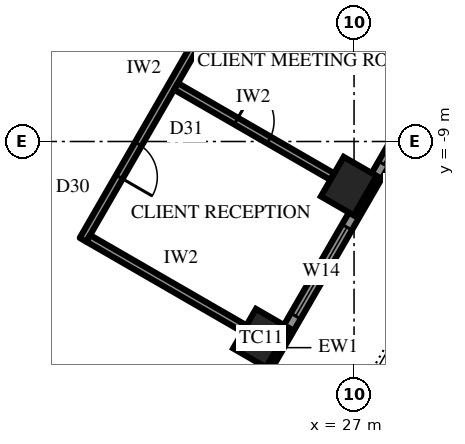
"""IFC4 building model, lengths in metres.
Left out: names, types, materials, properties, quantities, classifications, styles, units other than length and angle.
Written with IfcOpenShell. Run it as: python <this file> out.ifc"""

import sys

from ifc_helpers import new_model, si_unit, direction, frame, frame_2d, origin, origin_2d, place, context, subcontext, project, spatial, rectangle, extrude, element, fill, save


model = new_model("IFC4")
c1 = context("Model", 3, precision=1e-05, world=origin(), true_north=direction((0.0, 1.0)))
c2 = subcontext(c1, "Body", "Model", "MODEL_VIEW")
j1 = project(units=[si_unit("LENGTHUNIT", "METRE"), si_unit("PLANEANGLEUNIT", "RADIAN")], contexts=[c1])
p1 = place(None, origin())
s1 = spatial("IfcSite", under=j1, at=p1, CompositionType="ELEMENT")
p2 = place(p1, origin())
s2 = spatial("IfcBuilding", under=s1, at=p2, CompositionType="ELEMENT")
p3 = place(p2, frame((0.0, 0.0, 257.5)))
s3 = spatial("IfcBuildingStorey", under=s2, at=p3, CompositionType="ELEMENT", Elevation=257.5)
for number, where, z_axis, x_axis in (
    (1, (24.552, -14.175, 0.0), (0.0, 0.0, 1.0), (0.5, 0.866, 0.0)),
    (2, (26.861, -10.175, 0.0), (0.0, 0.0, 1.0), (0.5, 0.866, 0.0)),
):
    element("IfcColumn", number, at=place(p3, frame(where, z_axis=z_axis, x_axis=x_axis)), inside=s3, PredefinedType="COLUMN", context=c2, shape_type="SweptSolid", body=[
        extrude(rectangle(XDim=1.2, YDim=1.0, at=origin_2d()), origin(), (0.0, 0.0, 1.0), 4.2),
    ])
p4 = place(p3, frame((18.707, -25.299, 0.0), z_axis=(0.0, 0.0, 1.0), x_axis=(0.500000442367, 0.866025148383, 0.0)))
e3 = element("IfcWall", 3, at=p4, inside=s3, PredefinedType="SOLIDWALL", context=c2, shape_type="SweptSolid", body=[
    extrude(rectangle(XDim=25.113, YDim=0.3, at=frame_2d((12.556, 0.0))), origin(), (0.0, 0.0, 1.0), 2.8),
])
p5 = place(p4, frame((4.278, 0.0, 0.6)))
e4 = element("IfcOpeningElement", 4, at=p5, cuts=e3, PredefinedType="OPENING", context=c2, shape_type="SweptSolid", body=[
    extrude(rectangle(XDim=2.7, YDim=1.95, at=frame_2d((1.35, 0.975))), frame((0.0, 0.16, 0.0), z_axis=(0.0, -1.0, 0.0), x_axis=(1.0, 0.0, 0.0)), (0.0, 0.0, 1.0), 0.32),
])
p6 = place(p4, frame((9.647, 0.0, 0.0)))
e5 = element("IfcOpeningElement", 5, at=p6, cuts=e3, PredefinedType="OPENING", context=c2, shape_type="SweptSolid", body=[
    extrude(rectangle(XDim=1.2, YDim=2.4, at=frame_2d((0.6, 1.2))), frame((0.0, 0.16, 0.0), z_axis=(0.0, -1.0, 0.0), x_axis=(1.0, 0.0, 0.0)), (0.0, 0.0, 1.0), 0.32),
])
p7 = place(p4, frame((13.516, 0.0, 0.6)))
e6 = element("IfcOpeningElement", 6, at=p7, cuts=e3, PredefinedType="OPENING", context=c2, shape_type="SweptSolid", body=[
    extrude(rectangle(XDim=2.7, YDim=1.95, at=frame_2d((1.35, 0.975))), frame((0.0, 0.16, 0.0), z_axis=(0.0, -1.0, 0.0), x_axis=(1.0, 0.0, 0.0)), (0.0, 0.0, 1.0), 0.32),
])
p8 = place(p4, frame((18.135, 0.0, 0.6)))
e7 = element("IfcOpeningElement", 7, at=p8, cuts=e3, PredefinedType="OPENING", context=c2, shape_type="SweptSolid", body=[
    extrude(rectangle(XDim=2.7, YDim=1.95, at=frame_2d((1.35, 0.975))), frame((0.0, 0.16, 0.0), z_axis=(0.0, -1.0, 0.0), x_axis=(1.0, 0.0, 0.0)), (0.0, 0.0, 1.0), 0.32),
])
p9 = place(p3, frame((19.869, -11.587, 0.0), z_axis=(0.0, 0.0, 1.0), x_axis=(0.499989672313, 0.866031366395, 0.0)))
e8 = element("IfcWall", 8, at=p9, inside=s3, PredefinedType="PARTITIONING", context=c2, shape_type="SweptSolid", body=[
    extrude(rectangle(XDim=9.438, YDim=0.2, at=frame_2d((4.719, 0.0))), origin(), (0.0, 0.0, 1.0), 4.0),
])
p10 = place(p9, frame((1.909, 0.0, 0.0)))
e9 = element("IfcOpeningElement", 9, at=p10, cuts=e8, PredefinedType="OPENING", context=c2, shape_type="SweptSolid", body=[
    extrude(rectangle(XDim=1.0, YDim=2.2, at=frame_2d((0.5, 1.1))), frame((0.0, 0.11, 0.0), z_axis=(0.0, -1.0, 0.0), x_axis=(1.0, 0.0, 0.0)), (0.0, 0.0, 1.0), 0.22),
])
p11 = place(p3, frame((20.005, -11.55, 0.0), z_axis=(0.0, 0.0, 1.0), x_axis=(0.866033238375, -0.499986429846, 0.0)))
e10 = element("IfcWall", 10, at=p11, inside=s3, PredefinedType="PARTITIONING", context=c2, shape_type="SweptSolid", body=[
    extrude(rectangle(XDim=4.75, YDim=0.2, at=frame_2d((2.375, 0.0))), origin(), (0.0, 0.0, 1.0), 3.082),
])
p12 = place(p3, frame((22.315, -7.55, 0.0), z_axis=(0.0, 0.0, 1.0), x_axis=(0.866020389056, -0.500008685663, 0.0)))
e11 = element("IfcWall", 11, at=p12, inside=s3, PredefinedType="PARTITIONING", context=c2, shape_type="SweptSolid", body=[
    extrude(rectangle(XDim=4.75, YDim=0.2, at=frame_2d((2.375, 0.0))), origin(), (0.0, 0.0, 1.0), 3.082),
])
p13 = place(p12, frame((1.825, 0.0, 0.0)))
e12 = element("IfcOpeningElement", 12, at=p13, cuts=e11, PredefinedType="OPENING", context=c2, shape_type="SweptSolid", body=[
    extrude(rectangle(XDim=1.0, YDim=2.2, at=frame_2d((0.5, 1.1))), frame((0.0, 0.11, 0.0), z_axis=(0.0, -1.0, 0.0), x_axis=(1.0, 0.0, 0.0)), (0.0, 0.0, 1.0), 0.22),
])
p14 = place(p7, origin())
e13 = element("IfcWindow", 13, at=p14, inside=s3, PartitioningType="SINGLE_PANEL", PredefinedType="WINDOW", context=c2, shape_type="SweptSolid", body=[
    extrude(rectangle(XDim=2.7, YDim=1.95, at=frame_2d((1.35, 0.975))), frame((0.0, 0.03, 0.0), z_axis=(0.0, -1.0, 0.0), x_axis=(1.0, 0.0, 0.0)), (0.0, 0.0, 1.0), 0.06),
])
fill(e6, e13)
p15 = place(p8, origin())
e14 = element("IfcWindow", 14, at=p15, inside=s3, PartitioningType="SINGLE_PANEL", PredefinedType="WINDOW", context=c2, shape_type="SweptSolid", body=[
    extrude(rectangle(XDim=2.7, YDim=1.95, at=frame_2d((1.35, 0.975))), frame((0.0, 0.03, 0.0), z_axis=(0.0, -1.0, 0.0), x_axis=(1.0, 0.0, 0.0)), (0.0, 0.0, 1.0), 0.06),
])
fill(e7, e14)
p16 = place(p10, frame((1.0, 0.0, 0.0), z_axis=(0.0, 0.0, 1.0), x_axis=(-1.0, 0.0, 0.0)))
e15 = element("IfcDoor", 15, at=p16, inside=s3, OperationType="SINGLE_SWING_LEFT", PredefinedType="DOOR", context=c2, shape_type="SweptSolid", body=[
    extrude(rectangle(XDim=1.0, YDim=2.2, at=frame_2d((0.5, 1.1))), frame((0.0, 0.025, 0.0), z_axis=(0.0, -1.0, 0.0), x_axis=(1.0, 0.0, 0.0)), (0.0, 0.0, 1.0), 0.05),
])
fill(e9, e15)
p17 = place(p13, origin())
e16 = element("IfcDoor", 16, at=p17, inside=s3, OperationType="SINGLE_SWING_RIGHT", PredefinedType="DOOR", context=c2, shape_type="SweptSolid", body=[
    extrude(rectangle(XDim=1.0, YDim=2.2, at=frame_2d((0.5, 1.1))), frame((0.0, 0.025, 0.0), z_axis=(0.0, -1.0, 0.0), x_axis=(1.0, 0.0, 0.0)), (0.0, 0.0, 1.0), 0.05),
])
fill(e12, e16)
save(model, sys.argv[1])
